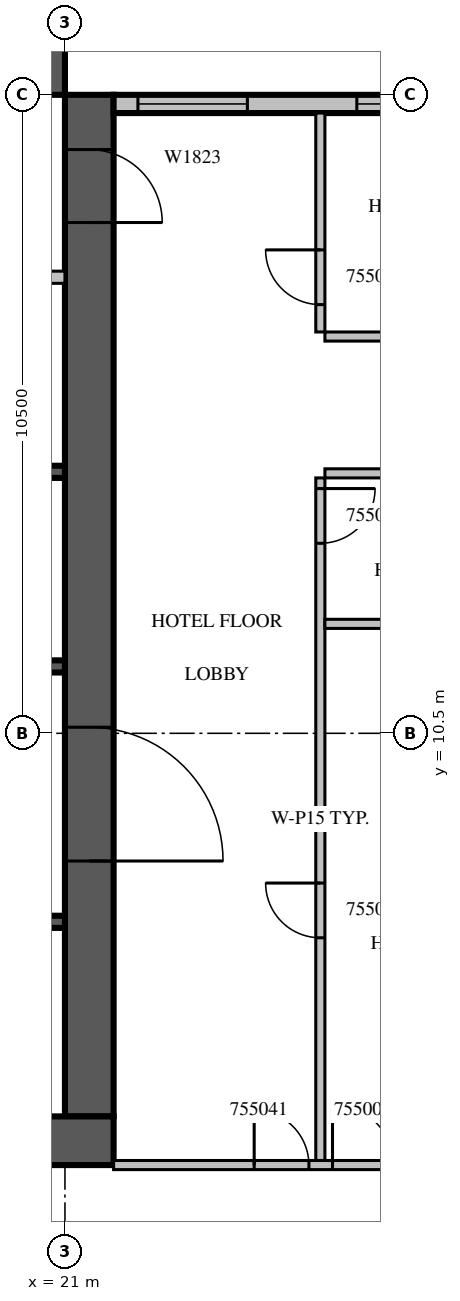
"""IFC4 building model, lengths in metres.
Left out: names, types, materials, properties, quantities, classifications, styles, units other than length and angle.
Written with IfcOpenShell. Run it as: python <this file> out.ifc"""

import sys

from ifc_helpers import new_model, si_unit, direction, frame, frame_2d, origin, place, context, subcontext, project, spatial, rectangle, extrude, source, transform, mapped, element, fill, save


model = new_model("IFC4")
c1 = context("Model", 3, precision=1e-05, world=origin(), true_north=direction((0.0, 1.0)))
c2 = subcontext(c1, "Body", "Model", "MODEL_VIEW")
j1 = project(units=[si_unit("LENGTHUNIT", "METRE"), si_unit("PLANEANGLEUNIT", "RADIAN")], contexts=[c1])
p1 = place(None, origin())
s1 = spatial("IfcSite", under=j1, at=p1, CompositionType="ELEMENT")
p2 = place(p1, origin())
s2 = spatial("IfcBuilding", under=s1, at=p2, CompositionType="ELEMENT")
p3 = place(p2, frame((0.0, 0.0, 242.4)))
s3 = spatial("IfcBuildingStorey", under=s2, at=p3, CompositionType="ELEMENT", Elevation=242.4)
m1 = source(origin(), c2, "Body", "SweptSolid", [
    extrude(rectangle(XDim=16.8, YDim=0.8, at=frame_2d((8.4, 0.0))), origin(), (0.0, 0.0, 1.0), 3.8),
])
p4 = place(p3, frame((21.4, 4.2, 0.0), z_axis=(0.0, 0.0, 1.0), x_axis=(0.0, 1.0, 0.0)))
e1 = element("IfcWall", 1, at=p4, inside=s3, PredefinedType="SHEAR", context=c2, shape_type="MappedRepresentation", body=[
    mapped(m1, transform((0.0, 0.0, 0.0), scale=1.0)),
])
m2 = source(origin(), c2, "Body", "SweptSolid", [
    extrude(rectangle(XDim=2.2, YDim=2.1, at=frame_2d((1.1, 1.05))), frame((0.0, 0.41, 0.0), z_axis=(0.0, -1.0, 0.0), x_axis=(1.0, 0.0, 0.0)), (0.0, 0.0, 1.0), 0.82),
])
p5 = place(p4, frame((4.2, 0.0, 0.0)))
e2 = element("IfcOpeningElement", 2, at=p5, cuts=e1, PredefinedType="OPENING", context=c2, shape_type="MappedRepresentation", body=[
    mapped(m2, transform((0.0, 0.0, 0.0), scale=1.0)),
])
m3 = source(origin(), c2, "Body", "SweptSolid", [
    extrude(rectangle(XDim=1.2, YDim=2.1, at=frame_2d((0.6, 1.05))), frame((0.0, 0.41, 0.0), z_axis=(0.0, -1.0, 0.0), x_axis=(1.0, 0.0, 0.0)), (0.0, 0.0, 1.0), 0.82),
])
p6 = place(p4, frame((14.7, 0.0, 0.0)))
e3 = element("IfcOpeningElement", 3, at=p6, cuts=e1, PredefinedType="OPENING", context=c2, shape_type="MappedRepresentation", body=[
    mapped(m3, transform((0.0, 0.0, 0.0), scale=1.0)),
])
m4 = source(origin(), c2, "Body", "SweptSolid", [
    extrude(rectangle(XDim=17.6, YDim=0.8, at=frame_2d((8.8, 0.0))), origin(), (0.0, 0.0, 1.0), 3.8),
])
p7 = place(p3, frame((4.2, 3.8, 0.0), z_axis=(0.0, 0.0, 1.0), x_axis=(1.0, 0.0, 0.0)))
e4 = element("IfcWall", 4, at=p7, inside=s3, PredefinedType="SHEAR", context=c2, shape_type="MappedRepresentation", body=[
    mapped(m4, transform((0.0, 0.0, 0.0), scale=1.0)),
])
m5 = source(origin(), c2, "Body", "SweptSolid", [
    extrude(rectangle(XDim=0.9, YDim=2.1, at=frame_2d((0.45, 1.05))), frame((0.0, 0.41, 0.0), z_axis=(0.0, -1.0, 0.0), x_axis=(1.0, 0.0, 0.0)), (0.0, 0.0, 1.0), 0.82),
])
p8 = place(p7, frame((12.75, 0.0, 0.0)))
e5 = element("IfcOpeningElement", 5, at=p8, cuts=e4, PredefinedType="OPENING", context=c2, shape_type="MappedRepresentation", body=[
    mapped(m5, transform((0.0, 0.0, 0.0), scale=1.0)),
])
p9 = place(p3, frame((4.2, 21.4, 0.0), z_axis=(0.0, 0.0, 1.0), x_axis=(1.0, 0.0, 0.0)))
e6 = element("IfcWall", 6, at=p9, inside=s3, PredefinedType="SHEAR", context=c2, shape_type="MappedRepresentation", body=[
    mapped(m1, transform((0.0, 0.0, 0.0), scale=1.0)),
])
p10 = place(p9, frame((6.2, 0.0, 0.0)))
e7 = element("IfcOpeningElement", 7, at=p10, cuts=e6, PredefinedType="OPENING", context=c2, shape_type="MappedRepresentation", body=[
    mapped(m3, transform((0.0, 0.0, 0.0), scale=1.0)),
])
m6 = source(origin(), c2, "Body", "SweptSolid", [
    extrude(rectangle(XDim=7.2, YDim=0.3, at=frame_2d((3.6, 0.0))), origin(), (0.0, 0.0, 1.0), 3.4),
])
p11 = place(p3, frame((29.0, 20.85, 0.0), z_axis=(0.0, 0.0, 1.0), x_axis=(-1.0, 0.0, 0.0)))
e8 = element("IfcWall", 8, at=p11, inside=s3, PredefinedType="STANDARD", context=c2, shape_type="MappedRepresentation", body=[
    mapped(m6, transform((0.0, 0.0, 0.0), scale=1.0)),
])
m7 = source(origin(), c2, "Body", "SweptSolid", [
    extrude(rectangle(XDim=3.0, YDim=2.3, at=frame_2d((1.5, 1.15))), frame((0.0, 0.16, 0.0), z_axis=(0.0, -1.0, 0.0), x_axis=(1.0, 0.0, 0.0)), (0.0, 0.0, 1.0), 0.32),
])
p12 = place(p11, frame((0.2, 0.0, 0.6)))
e9 = element("IfcOpeningElement", 9, at=p12, cuts=e8, PredefinedType="OPENING", context=c2, shape_type="MappedRepresentation", body=[
    mapped(m7, transform((0.0, 0.0, 0.0), scale=1.0)),
])
m8 = source(origin(), c2, "Body", "SweptSolid", [
    extrude(rectangle(XDim=1.8, YDim=2.3, at=frame_2d((0.9, 1.15))), frame((0.0, 0.16, 0.0), z_axis=(0.0, -1.0, 0.0), x_axis=(1.0, 0.0, 0.0)), (0.0, 0.0, 1.0), 0.32),
])
p13 = place(p11, frame((5.0, 0.0, 0.6)))
e10 = element("IfcOpeningElement", 10, at=p13, cuts=e8, PredefinedType="OPENING", context=c2, shape_type="MappedRepresentation", body=[
    mapped(m8, transform((0.0, 0.0, 0.0), scale=1.0)),
])
m9 = source(origin(), c2, "Body", "SweptSolid", [
    extrude(rectangle(XDim=2.4, YDim=0.2, at=frame_2d((1.2, 0.0))), origin(), (0.0, 0.0, 1.0), 3.8),
])
p14 = place(p3, frame((18.6, 7.4, 0.0), z_axis=(0.0, 0.0, 1.0), x_axis=(1.0, 0.0, 0.0)))
e11 = element("IfcWall", 11, at=p14, inside=s3, PredefinedType="SOLIDWALL", context=c2, shape_type="MappedRepresentation", body=[
    mapped(m9, transform((0.0, 0.0, 0.0), scale=1.0)),
])
m10 = source(origin(), c2, "Body", "SweptSolid", [
    extrude(rectangle(XDim=9.6, YDim=0.2, at=frame_2d((4.8, 0.0))), origin(), (0.0, 0.0, 1.0), 3.8),
])
p15 = place(p3, frame((11.4, 11.6, 0.0), z_axis=(0.0, 0.0, 1.0), x_axis=(1.0, 0.0, 0.0)))
e12 = element("IfcWall", 12, at=p15, inside=s3, PredefinedType="SOLIDWALL", context=c2, shape_type="MappedRepresentation", body=[
    mapped(m10, transform((0.0, 0.0, 0.0), scale=1.0)),
])
p16 = place(p3, frame((11.4, 14.8, 0.0), z_axis=(0.0, 0.0, 1.0), x_axis=(1.0, 0.0, 0.0)))
e13 = element("IfcWall", 13, at=p16, inside=s3, PredefinedType="SOLIDWALL", context=c2, shape_type="MappedRepresentation", body=[
    mapped(m10, transform((0.0, 0.0, 0.0), scale=1.0)),
])
m11 = source(origin(), c2, "Body", "SweptSolid", [
    extrude(rectangle(XDim=1.1, YDim=2.1, at=frame_2d((0.55, 1.05))), frame((0.0, 0.11, 0.0), z_axis=(0.0, -1.0, 0.0), x_axis=(1.0, 0.0, 0.0)), (0.0, 0.0, 1.0), 0.22),
])
p17 = place(p16, frame((3.05, 0.0, 0.0)))
e14 = element("IfcOpeningElement", 14, at=p17, cuts=e13, PredefinedType="OPENING", context=c2, shape_type="MappedRepresentation", body=[
    mapped(m11, transform((0.0, 0.0, 0.0), scale=1.0)),
])
p18 = place(p16, frame((5.45, 0.0, 0.0)))
e15 = element("IfcOpeningElement", 15, at=p18, cuts=e13, PredefinedType="OPENING", context=c2, shape_type="MappedRepresentation", body=[
    mapped(m11, transform((0.0, 0.0, 0.0), scale=1.0)),
])
p19 = place(p16, frame((7.85, 0.0, 0.0)))
e16 = element("IfcOpeningElement", 16, at=p19, cuts=e13, PredefinedType="OPENING", context=c2, shape_type="MappedRepresentation", body=[
    mapped(m11, transform((0.0, 0.0, 0.0), scale=1.0)),
])
m12 = source(origin(), c2, "Body", "SweptSolid", [
    extrude(rectangle(XDim=11.45, YDim=0.2, at=frame_2d((5.725, 0.0))), origin(), (0.0, 0.0, 1.0), 3.4),
])
p20 = place(p3, frame((9.55, 18.0, 0.0), z_axis=(0.0, 0.0, 1.0), x_axis=(1.0, 0.0, 0.0)))
e17 = element("IfcWall", 17, at=p20, inside=s3, PredefinedType="PARTITIONING", context=c2, shape_type="MappedRepresentation", body=[
    mapped(m12, transform((0.0, 0.0, 0.0), scale=1.0)),
])
m13 = source(origin(), c2, "Body", "SweptSolid", [
    extrude(rectangle(XDim=0.9, YDim=2.1, at=frame_2d((0.45, 1.05))), frame((0.0, 0.11, 0.0), z_axis=(0.0, -1.0, 0.0), x_axis=(1.0, 0.0, 0.0)), (0.0, 0.0, 1.0), 0.22),
])
p21 = place(p20, frame((0.475, 0.0, 0.0)))
e18 = element("IfcOpeningElement", 18, at=p21, cuts=e17, PredefinedType="OPENING", context=c2, shape_type="MappedRepresentation", body=[
    mapped(m13, transform((0.0, 0.0, 0.0), scale=1.0)),
])
p22 = place(p20, frame((1.85, 0.0, 0.0)))
e19 = element("IfcOpeningElement", 19, at=p22, cuts=e17, PredefinedType="OPENING", context=c2, shape_type="MappedRepresentation", body=[
    mapped(m13, transform((0.0, 0.0, 0.0), scale=1.0)),
])
p23 = place(p20, frame((3.125, 0.0, 0.0)))
e20 = element("IfcOpeningElement", 20, at=p23, cuts=e17, PredefinedType="OPENING", context=c2, shape_type="MappedRepresentation", body=[
    mapped(m13, transform((0.0, 0.0, 0.0), scale=1.0)),
])
p24 = place(p20, frame((7.35, 0.0, 0.0)))
e21 = element("IfcOpeningElement", 21, at=p24, cuts=e17, PredefinedType="OPENING", context=c2, shape_type="MappedRepresentation", body=[
    mapped(m11, transform((0.0, 0.0, 0.0), scale=1.0)),
])
m14 = source(origin(), c2, "Body", "SweptSolid", [
    extrude(rectangle(XDim=11.225, YDim=0.15, at=frame_2d((5.612, 0.0))), origin(), (0.0, 0.0, 1.0), 3.4),
])
p25 = place(p3, frame((25.2, 14.7, 0.0), z_axis=(0.0, 0.0, 1.0), x_axis=(0.0, -1.0, 0.0)))
e22 = element("IfcWall", 22, at=p25, inside=s3, PredefinedType="PARTITIONING", context=c2, shape_type="MappedRepresentation", body=[
    mapped(m14, transform((0.0, 0.0, 0.0), scale=1.0)),
])
m15 = source(origin(), c2, "Body", "SweptSolid", [
    extrude(rectangle(XDim=0.9, YDim=2.1, at=frame_2d((0.45, 1.05))), frame((0.0, 0.085, 0.0), z_axis=(0.0, -1.0, 0.0), x_axis=(1.0, 0.0, 0.0)), (0.0, 0.0, 1.0), 0.17),
])
p26 = place(p25, frame((6.662, 0.0, 0.0)))
e23 = element("IfcOpeningElement", 23, at=p26, cuts=e22, PredefinedType="OPENING", context=c2, shape_type="MappedRepresentation", body=[
    mapped(m15, transform((0.0, 0.0, 0.0), scale=1.0)),
])
p27 = place(p25, frame((0.175, 0.0, 0.0)))
e24 = element("IfcOpeningElement", 24, at=p27, cuts=e22, PredefinedType="OPENING", context=c2, shape_type="MappedRepresentation", body=[
    mapped(m15, transform((0.0, 0.0, 0.0), scale=1.0)),
])
m16 = source(origin(), c2, "Body", "SweptSolid", [
    extrude(rectangle(XDim=3.6, YDim=0.15, at=frame_2d((1.8, 0.0))), origin(), (0.0, 0.0, 1.0), 3.4),
])
p28 = place(p3, frame((25.2, 20.7, 0.0), z_axis=(0.0, 0.0, 1.0), x_axis=(0.0, -1.0, 0.0)))
e25 = element("IfcWall", 25, at=p28, inside=s3, PredefinedType="PARTITIONING", context=c2, shape_type="MappedRepresentation", body=[
    mapped(m16, transform((0.0, 0.0, 0.0), scale=1.0)),
])
p29 = place(p28, frame((2.25, 0.0, 0.0)))
e26 = element("IfcOpeningElement", 26, at=p29, cuts=e25, PredefinedType="OPENING", context=c2, shape_type="MappedRepresentation", body=[
    mapped(m15, transform((0.0, 0.0, 0.0), scale=1.0)),
])
m17 = source(origin(), c2, "Body", "SweptSolid", [
    extrude(rectangle(XDim=4.05, YDim=0.15, at=frame_2d((2.025, 0.0))), origin(), (0.0, 0.0, 1.0), 3.4),
])
for number, where, z_axis, x_axis in (
    (27, (29.325, 12.3, 0.0), (0.0, 0.0, 1.0), (-1.0, 0.0, 0.0)),
    (28, (29.325, 14.775, 0.0), (0.0, 0.0, 1.0), (-1.0, 0.0, 0.0)),
    (29, (25.275, 17.025, 0.0), (0.0, 0.0, 1.0), (1.0, 0.0, 0.0)),
):
    element("IfcWall", number, at=place(p3, frame(where, z_axis=z_axis, x_axis=x_axis)), inside=s3, PredefinedType="PARTITIONING", context=c2, shape_type="MappedRepresentation", body=[
        mapped(m17, transform((0.0, 0.0, 0.0), scale=1.0)),
    ])
m18 = source(origin(), c2, "Body", "SweptSolid", [
    extrude(rectangle(XDim=7.525, YDim=0.15, at=frame_2d((3.763, 0.0))), origin(), (0.0, 0.0, 1.0), 3.4),
])
p30 = place(p3, frame((21.8, 3.4, 0.0), z_axis=(0.0, 0.0, 1.0), x_axis=(1.0, 0.0, 0.0)))
e30 = element("IfcWall", 30, at=p30, inside=s3, PredefinedType="PARTITIONING", context=c2, shape_type="MappedRepresentation", body=[
    mapped(m18, transform((0.0, 0.0, 0.0), scale=1.0)),
])
m19 = source(origin(), c2, "Body", "SweptSolid", [
    extrude(rectangle(XDim=1.0, YDim=2.1, at=frame_2d((0.5, 1.05))), frame((0.0, 0.085, 0.0), z_axis=(0.0, -1.0, 0.0), x_axis=(1.0, 0.0, 0.0)), (0.0, 0.0, 1.0), 0.17),
])
p31 = place(p30, frame((3.6, 0.0, 0.0)))
e31 = element("IfcOpeningElement", 31, at=p31, cuts=e30, PredefinedType="OPENING", context=c2, shape_type="MappedRepresentation", body=[
    mapped(m19, transform((0.0, 0.0, 0.0), scale=1.0)),
])
p32 = place(p30, frame((2.312, 0.0, 0.0)))
e32 = element("IfcOpeningElement", 32, at=p32, cuts=e30, PredefinedType="OPENING", context=c2, shape_type="MappedRepresentation", body=[
    mapped(m15, transform((0.0, 0.0, 0.0), scale=1.0)),
])
m20 = source(origin(), c2, "Body", "SweptSolid", [
    extrude(rectangle(XDim=3.0, YDim=2.3, at=frame_2d((1.5, 1.15))), frame((0.0, 0.03, 0.0), z_axis=(0.0, -1.0, 0.0), x_axis=(1.0, 0.0, 0.0)), (0.0, 0.0, 1.0), 0.06),
])
p33 = place(p12, origin())
e33 = element("IfcWindow", 33, at=p33, inside=s3, PartitioningType="SINGLE_PANEL", PredefinedType="WINDOW", context=c2, shape_type="MappedRepresentation", body=[
    mapped(m20, transform((0.0, 0.0, 0.0), scale=1.0)),
])
fill(e9, e33)
m21 = source(origin(), c2, "Body", "SweptSolid", [
    extrude(rectangle(XDim=1.8, YDim=2.3, at=frame_2d((0.9, 1.15))), frame((0.0, 0.03, 0.0), z_axis=(0.0, -1.0, 0.0), x_axis=(1.0, 0.0, 0.0)), (0.0, 0.0, 1.0), 0.06),
])
p34 = place(p13, origin())
e34 = element("IfcWindow", 34, at=p34, inside=s3, PartitioningType="SINGLE_PANEL", PredefinedType="WINDOW", context=c2, shape_type="MappedRepresentation", body=[
    mapped(m21, transform((0.0, 0.0, 0.0), scale=1.0)),
])
fill(e10, e34)
m22 = source(origin(), c2, "Body", "SweptSolid", [
    extrude(rectangle(XDim=2.2, YDim=2.1, at=frame_2d((1.1, 1.05))), frame((0.0, 0.025, 0.0), z_axis=(0.0, -1.0, 0.0), x_axis=(1.0, 0.0, 0.0)), (0.0, 0.0, 1.0), 0.05),
])
p35 = place(p5, origin())
e35 = element("IfcDoor", 35, at=p35, inside=s3, OperationType="DOUBLE_DOOR_SINGLE_SWING", PredefinedType="DOOR", context=c2, shape_type="MappedRepresentation", body=[
    mapped(m22, transform((0.0, 0.0, 0.0), scale=1.0)),
])
fill(e2, e35)
m23 = source(origin(), c2, "Body", "SweptSolid", [
    extrude(rectangle(XDim=1.2, YDim=2.1, at=frame_2d((0.6, 1.05))), frame((0.0, 0.025, 0.0), z_axis=(0.0, -1.0, 0.0), x_axis=(1.0, 0.0, 0.0)), (0.0, 0.0, 1.0), 0.05),
])
p36 = place(p6, origin())
e36 = element("IfcDoor", 36, at=p36, inside=s3, OperationType="SINGLE_SWING_RIGHT", PredefinedType="DOOR", context=c2, shape_type="MappedRepresentation", body=[
    mapped(m23, transform((0.0, 0.0, 0.0), scale=1.0)),
])
fill(e3, e36)
m24 = source(origin(), c2, "Body", "SweptSolid", [
    extrude(rectangle(XDim=0.9, YDim=2.1, at=frame_2d((0.45, 1.05))), frame((0.0, 0.025, 0.0), z_axis=(0.0, -1.0, 0.0), x_axis=(1.0, 0.0, 0.0)), (0.0, 0.0, 1.0), 0.05),
])
p37 = place(p26, origin())
e37 = element("IfcDoor", 37, at=p37, inside=s3, OperationType="SINGLE_SWING_RIGHT", PredefinedType="DOOR", context=c2, shape_type="MappedRepresentation", body=[
    mapped(m24, transform((0.0, 0.0, 0.0), scale=1.0)),
])
fill(e23, e37)
p38 = place(p27, origin())
e38 = element("IfcDoor", 38, at=p38, inside=s3, OperationType="SINGLE_SWING_LEFT", PredefinedType="DOOR", context=c2, shape_type="MappedRepresentation", body=[
    mapped(m24, transform((0.0, 0.0, 0.0), scale=1.0)),
])
fill(e24, e38)
p39 = place(p29, origin())
e39 = element("IfcDoor", 39, at=p39, inside=s3, OperationType="SINGLE_SWING_RIGHT", PredefinedType="DOOR", context=c2, shape_type="MappedRepresentation", body=[
    mapped(m24, transform((0.0, 0.0, 0.0), scale=1.0)),
])
fill(e26, e39)
m25 = source(origin(), c2, "Body", "SweptSolid", [
    extrude(rectangle(XDim=1.0, YDim=2.1, at=frame_2d((0.5, 1.05))), frame((0.0, 0.025, 0.0), z_axis=(0.0, -1.0, 0.0), x_axis=(1.0, 0.0, 0.0)), (0.0, 0.0, 1.0), 0.05),
])
p40 = place(p31, origin())
e40 = element("IfcDoor", 40, at=p40, inside=s3, OperationType="SINGLE_SWING_LEFT", PredefinedType="DOOR", context=c2, shape_type="MappedRepresentation", body=[
    mapped(m25, transform((0.0, 0.0, 0.0), scale=1.0)),
])
fill(e31, e40)
p41 = place(p32, origin())
e41 = element("IfcDoor", 41, at=p41, inside=s3, OperationType="SINGLE_SWING_LEFT", PredefinedType="DOOR", context=c2, shape_type="MappedRepresentation", body=[
    mapped(m24, transform((0.0, 0.0, 0.0), scale=1.0)),
])
fill(e32, e41)
save(model, sys.argv[1])
